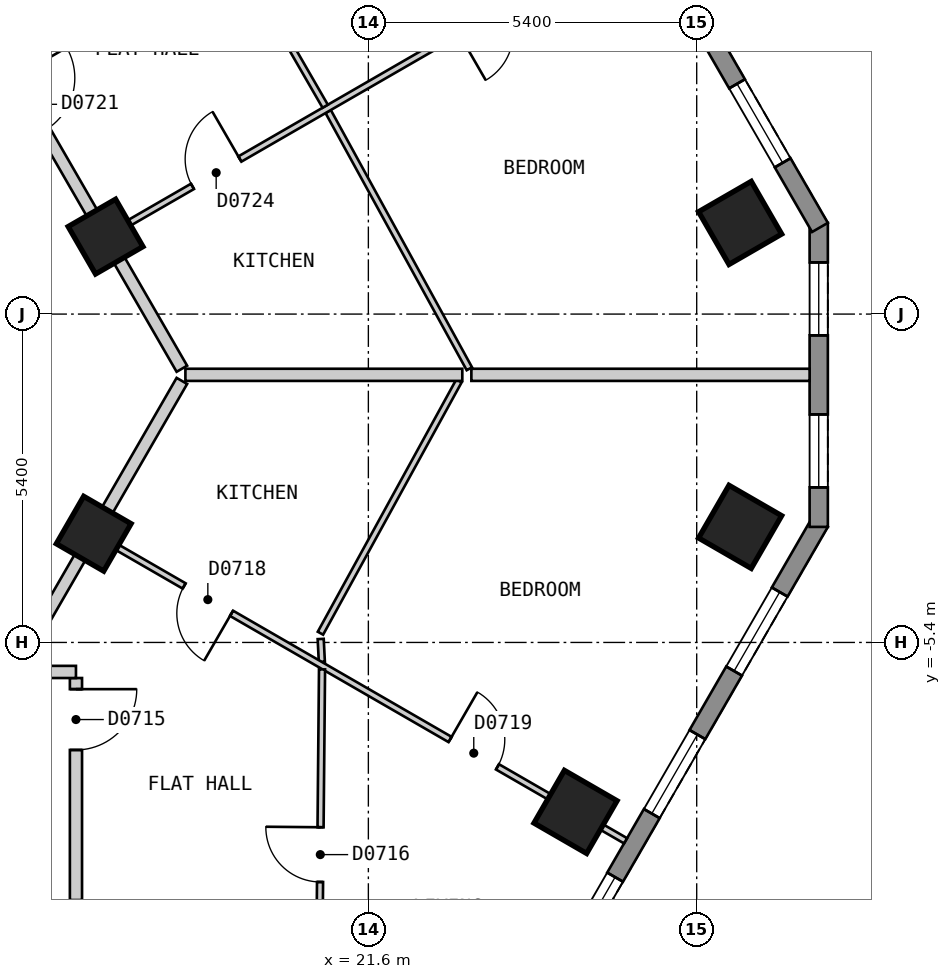
"""IFC4 building model, lengths in metres.
Left out: names, types, materials, properties, quantities, classifications, styles, units other than length and angle.
Written with IfcOpenShell. Run it as: python <this file> out.ifc"""

import sys

from ifc_helpers import new_model, si_unit, direction, frame, frame_2d, origin, origin_2d, place, context, subcontext, project, spatial, polyline, rectangle, outline, extrude, element, fill, save


model = new_model("IFC4")
c1 = context("Model", 3, precision=1e-05, world=origin(), true_north=direction((0.0, 1.0)))
c2 = subcontext(c1, "Body", "Model", "MODEL_VIEW")
j1 = project(units=[si_unit("LENGTHUNIT", "METRE"), si_unit("PLANEANGLEUNIT", "RADIAN")], contexts=[c1])
p1 = place(None, origin())
s1 = spatial("IfcSite", under=j1, at=p1, CompositionType="ELEMENT")
p2 = place(p1, origin())
s2 = spatial("IfcBuilding", under=s1, at=p2, CompositionType="ELEMENT")
p3 = place(p2, frame((0.0, 0.0, 99.0)))
s3 = spatial("IfcBuildingStorey", under=s2, at=p3, CompositionType="ELEMENT", Elevation=99.0)
for number, where, z_axis, x_axis in (
    (1, (25.007, -8.187, 0.0), (0.0, 0.0, 1.0), (0.5, 0.866, 0.0)),
    (2, (27.714, -3.499, 0.0), (0.0, 0.0, 1.0), (0.5, 0.866, 0.0)),
    (3, (27.714, 1.499, 0.0), (0.0, 0.0, 1.0), (-0.5, 0.866, 0.0)),
):
    element("IfcColumn", number, at=place(p3, frame(where, z_axis=z_axis, x_axis=x_axis)), inside=s3, PredefinedType="COLUMN", context=c2, shape_type="SweptSolid", body=[
        extrude(rectangle(XDim=1.0, YDim=1.0, at=origin_2d()), origin(), (0.0, 0.0, 1.0), 3.0),
    ])
for number, where, z_axis, x_axis in (
    (4, (17.083, -3.612, 0.0), (0.0, 0.0, 1.0), (0.5, 0.866, 0.0)),
    (5, (17.278, 1.274, 0.0), (0.0, 0.0, 1.0), (-0.5, 0.866, 0.0)),
):
    element("IfcColumn", number, at=place(p3, frame(where, z_axis=z_axis, x_axis=x_axis)), inside=s3, PredefinedType="COLUMN", context=c2, shape_type="SweptSolid", body=[
        extrude(rectangle(XDim=0.9, YDim=0.9, at=origin_2d()), origin(), (0.0, 0.0, 1.0), 3.0),
    ])
p4 = place(p3, frame((17.479, -23.425, 0.0), z_axis=(0.0, 0.0, 1.0), x_axis=(0.500035407905, 0.866004960056, 0.0)))
e6 = element("IfcWall", 6, at=p4, inside=s3, PredefinedType="SOLIDWALL", context=c2, shape_type="SweptSolid", body=[
    extrude(outline(polyline([(0.0, -0.15), (23.094, -0.15), (23.014, 0.15), (0.08, 0.15), (0.0, -0.15)])), origin(), (0.0, 0.0, 1.0), 2.7),
])
p5 = place(p4, frame((1.324, 0.0, 0.15)))
e7 = element("IfcOpeningElement", 7, at=p5, cuts=e6, PredefinedType="OPENING", context=c2, shape_type="SweptSolid", body=[
    extrude(rectangle(XDim=1.5, YDim=2.1, at=frame_2d((0.75, 1.05))), frame((0.0, 0.16, 0.0), z_axis=(0.0, -1.0, 0.0), x_axis=(1.0, 0.0, 0.0)), (0.0, 0.0, 1.0), 0.32),
])
p6 = place(p4, frame((4.031, 0.0, 0.15)))
e8 = element("IfcOpeningElement", 8, at=p6, cuts=e6, PredefinedType="OPENING", context=c2, shape_type="SweptSolid", body=[
    extrude(rectangle(XDim=1.5, YDim=2.1, at=frame_2d((0.75, 1.05))), frame((0.0, 0.16, 0.0), z_axis=(0.0, -1.0, 0.0), x_axis=(1.0, 0.0, 0.0)), (0.0, 0.0, 1.0), 0.32),
])
p7 = place(p4, frame((6.737, 0.0, 0.15)))
e9 = element("IfcOpeningElement", 9, at=p7, cuts=e6, PredefinedType="OPENING", context=c2, shape_type="SweptSolid", body=[
    extrude(rectangle(XDim=1.5, YDim=2.1, at=frame_2d((0.75, 1.05))), frame((0.0, 0.16, 0.0), z_axis=(0.0, -1.0, 0.0), x_axis=(1.0, 0.0, 0.0)), (0.0, 0.0, 1.0), 0.32),
])
p8 = place(p4, frame((9.444, 0.0, 0.15)))
e10 = element("IfcOpeningElement", 10, at=p8, cuts=e6, PredefinedType="OPENING", context=c2, shape_type="SweptSolid", body=[
    extrude(rectangle(XDim=1.5, YDim=2.1, at=frame_2d((0.75, 1.05))), frame((0.0, 0.16, 0.0), z_axis=(0.0, -1.0, 0.0), x_axis=(1.0, 0.0, 0.0)), (0.0, 0.0, 1.0), 0.32),
])
p9 = place(p4, frame((12.151, 0.0, 0.15)))
e11 = element("IfcOpeningElement", 11, at=p9, cuts=e6, PredefinedType="OPENING", context=c2, shape_type="SweptSolid", body=[
    extrude(rectangle(XDim=1.5, YDim=2.1, at=frame_2d((0.75, 1.05))), frame((0.0, 0.16, 0.0), z_axis=(0.0, -1.0, 0.0), x_axis=(1.0, 0.0, 0.0)), (0.0, 0.0, 1.0), 0.32),
])
p10 = place(p4, frame((14.857, 0.0, 0.15)))
e12 = element("IfcOpeningElement", 12, at=p10, cuts=e6, PredefinedType="OPENING", context=c2, shape_type="SweptSolid", body=[
    extrude(rectangle(XDim=1.5, YDim=2.1, at=frame_2d((0.75, 1.05))), frame((0.0, 0.16, 0.0), z_axis=(0.0, -1.0, 0.0), x_axis=(1.0, 0.0, 0.0)), (0.0, 0.0, 1.0), 0.32),
])
p11 = place(p4, frame((17.564, 0.0, 0.15)))
e13 = element("IfcOpeningElement", 13, at=p11, cuts=e6, PredefinedType="OPENING", context=c2, shape_type="SweptSolid", body=[
    extrude(rectangle(XDim=1.5, YDim=2.1, at=frame_2d((0.75, 1.05))), frame((0.0, 0.16, 0.0), z_axis=(0.0, -1.0, 0.0), x_axis=(1.0, 0.0, 0.0)), (0.0, 0.0, 1.0), 0.32),
])
p12 = place(p4, frame((20.271, 0.0, 0.15)))
e14 = element("IfcOpeningElement", 14, at=p12, cuts=e6, PredefinedType="OPENING", context=c2, shape_type="SweptSolid", body=[
    extrude(rectangle(XDim=1.5, YDim=2.1, at=frame_2d((0.75, 1.05))), frame((0.0, 0.16, 0.0), z_axis=(0.0, -1.0, 0.0), x_axis=(1.0, 0.0, 0.0)), (0.0, 0.0, 1.0), 0.32),
])
p13 = place(p3, frame((29.007, -3.5, 0.0), z_axis=(0.0, 0.0, 1.0), x_axis=(0.0, 1.0, 0.0)))
e15 = element("IfcWall", 15, at=p13, inside=s3, PredefinedType="SOLIDWALL", context=c2, shape_type="SweptSolid", body=[
    extrude(outline(polyline([(0.0, -0.15), (5.0, -0.15), (4.92, 0.15), (0.08, 0.15), (0.0, -0.15)])), origin(), (0.0, 0.0, 1.0), 2.7),
])
p14 = place(p13, frame((0.65, 0.0, 0.15)))
e16 = element("IfcOpeningElement", 16, at=p14, cuts=e15, PredefinedType="OPENING", context=c2, shape_type="SweptSolid", body=[
    extrude(rectangle(XDim=1.2, YDim=2.1, at=frame_2d((0.6, 1.05))), frame((0.0, 0.16, 0.0), z_axis=(0.0, -1.0, 0.0), x_axis=(1.0, 0.0, 0.0)), (0.0, 0.0, 1.0), 0.32),
])
p15 = place(p13, frame((3.15, 0.0, 0.15)))
e17 = element("IfcOpeningElement", 17, at=p15, cuts=e15, PredefinedType="OPENING", context=c2, shape_type="SweptSolid", body=[
    extrude(rectangle(XDim=1.2, YDim=2.1, at=frame_2d((0.6, 1.05))), frame((0.0, 0.16, 0.0), z_axis=(0.0, -1.0, 0.0), x_axis=(1.0, 0.0, 0.0)), (0.0, 0.0, 1.0), 0.32),
])
p16 = place(p3, frame((29.027, 1.425, 0.0), z_axis=(0.0, 0.0, 1.0), x_axis=(-0.500027479704, 0.866009537788, 0.0)))
e18 = element("IfcWall", 18, at=p16, inside=s3, PredefinedType="SOLIDWALL", context=c2, shape_type="SweptSolid", body=[
    extrude(outline(polyline([(0.0, -0.15), (26.559, -0.15), (26.478, 0.15), (0.08, 0.15), (0.0, -0.15)])), origin(), (0.0, 0.0, 1.0), 2.7),
])
p17 = place(p16, frame((1.227, 0.0, 0.15)))
e19 = element("IfcOpeningElement", 19, at=p17, cuts=e18, PredefinedType="OPENING", context=c2, shape_type="SweptSolid", body=[
    extrude(rectangle(XDim=1.5, YDim=2.1, at=frame_2d((0.75, 1.05))), frame((0.0, 0.16, 0.0), z_axis=(0.0, -1.0, 0.0), x_axis=(1.0, 0.0, 0.0)), (0.0, 0.0, 1.0), 0.32),
])
p18 = place(p16, frame((3.738, 0.0, 0.15)))
e20 = element("IfcOpeningElement", 20, at=p18, cuts=e18, PredefinedType="OPENING", context=c2, shape_type="SweptSolid", body=[
    extrude(rectangle(XDim=1.5, YDim=2.1, at=frame_2d((0.75, 1.05))), frame((0.0, 0.16, 0.0), z_axis=(0.0, -1.0, 0.0), x_axis=(1.0, 0.0, 0.0)), (0.0, 0.0, 1.0), 0.32),
])
p19 = place(p16, frame((6.25, 0.0, 0.15)))
e21 = element("IfcOpeningElement", 21, at=p19, cuts=e18, PredefinedType="OPENING", context=c2, shape_type="SweptSolid", body=[
    extrude(rectangle(XDim=1.5, YDim=2.1, at=frame_2d((0.75, 1.05))), frame((0.0, 0.16, 0.0), z_axis=(0.0, -1.0, 0.0), x_axis=(1.0, 0.0, 0.0)), (0.0, 0.0, 1.0), 0.32),
])
p20 = place(p16, frame((8.761, 0.0, 0.15)))
e22 = element("IfcOpeningElement", 22, at=p20, cuts=e18, PredefinedType="OPENING", context=c2, shape_type="SweptSolid", body=[
    extrude(rectangle(XDim=1.5, YDim=2.1, at=frame_2d((0.75, 1.05))), frame((0.0, 0.16, 0.0), z_axis=(0.0, -1.0, 0.0), x_axis=(1.0, 0.0, 0.0)), (0.0, 0.0, 1.0), 0.32),
])
p21 = place(p16, frame((11.273, 0.0, 0.15)))
e23 = element("IfcOpeningElement", 23, at=p21, cuts=e18, PredefinedType="OPENING", context=c2, shape_type="SweptSolid", body=[
    extrude(rectangle(XDim=1.5, YDim=2.1, at=frame_2d((0.75, 1.05))), frame((0.0, 0.16, 0.0), z_axis=(0.0, -1.0, 0.0), x_axis=(1.0, 0.0, 0.0)), (0.0, 0.0, 1.0), 0.32),
])
p22 = place(p16, frame((13.785, 0.0, 0.15)))
e24 = element("IfcOpeningElement", 24, at=p22, cuts=e18, PredefinedType="OPENING", context=c2, shape_type="SweptSolid", body=[
    extrude(rectangle(XDim=1.5, YDim=2.1, at=frame_2d((0.75, 1.05))), frame((0.0, 0.16, 0.0), z_axis=(0.0, -1.0, 0.0), x_axis=(1.0, 0.0, 0.0)), (0.0, 0.0, 1.0), 0.32),
])
p23 = place(p16, frame((16.296, 0.0, 0.15)))
e25 = element("IfcOpeningElement", 25, at=p23, cuts=e18, PredefinedType="OPENING", context=c2, shape_type="SweptSolid", body=[
    extrude(rectangle(XDim=1.5, YDim=2.1, at=frame_2d((0.75, 1.05))), frame((0.0, 0.16, 0.0), z_axis=(0.0, -1.0, 0.0), x_axis=(1.0, 0.0, 0.0)), (0.0, 0.0, 1.0), 0.32),
])
p24 = place(p16, frame((18.807, 0.0, 0.15)))
e26 = element("IfcOpeningElement", 26, at=p24, cuts=e18, PredefinedType="OPENING", context=c2, shape_type="SweptSolid", body=[
    extrude(rectangle(XDim=1.5, YDim=2.1, at=frame_2d((0.75, 1.05))), frame((0.0, 0.16, 0.0), z_axis=(0.0, -1.0, 0.0), x_axis=(1.0, 0.0, 0.0)), (0.0, 0.0, 1.0), 0.32),
])
p25 = place(p16, frame((21.319, 0.0, 0.15)))
e27 = element("IfcOpeningElement", 27, at=p25, cuts=e18, PredefinedType="OPENING", context=c2, shape_type="SweptSolid", body=[
    extrude(rectangle(XDim=1.5, YDim=2.1, at=frame_2d((0.75, 1.05))), frame((0.0, 0.16, 0.0), z_axis=(0.0, -1.0, 0.0), x_axis=(1.0, 0.0, 0.0)), (0.0, 0.0, 1.0), 0.32),
])
p26 = place(p16, frame((23.831, 0.0, 0.15)))
e28 = element("IfcOpeningElement", 28, at=p26, cuts=e18, PredefinedType="OPENING", context=c2, shape_type="SweptSolid", body=[
    extrude(rectangle(XDim=1.5, YDim=2.1, at=frame_2d((0.75, 1.05))), frame((0.0, 0.16, 0.0), z_axis=(0.0, -1.0, 0.0), x_axis=(1.0, 0.0, 0.0)), (0.0, 0.0, 1.0), 0.32),
])
p27 = place(p3, frame((8.488, 16.5, 0.0), z_axis=(0.0, 0.0, 1.0), x_axis=(0.499986836607, -0.86603300354, 0.0)))
e29 = element("IfcWall", 29, at=p27, inside=s3, PredefinedType="PARTITIONING", context=c2, shape_type="SweptSolid", body=[
    extrude(rectangle(XDim=20.09, YDim=0.2, at=frame_2d((10.045, 0.0))), origin(), (0.0, 0.0, 1.0), 2.7),
])
p28 = place(p27, frame((14.569, 0.0, 0.0)))
e30 = element("IfcOpeningElement", 30, at=p28, cuts=e29, PredefinedType="OPENING", context=c2, shape_type="SweptSolid", body=[
    extrude(rectangle(XDim=1.0, YDim=2.1, at=frame_2d((0.5, 1.05))), frame((0.0, 0.11, 0.0), z_axis=(0.0, -1.0, 0.0), x_axis=(1.0, 0.0, 0.0)), (0.0, 0.0, 1.0), 0.22),
])
p29 = place(p27, frame((4.547, 0.0, 0.0)))
e31 = element("IfcOpeningElement", 31, at=p29, cuts=e29, PredefinedType="OPENING", context=c2, shape_type="SweptSolid", body=[
    extrude(rectangle(XDim=1.0, YDim=2.1, at=frame_2d((0.5, 1.05))), frame((0.0, 0.11, 0.0), z_axis=(0.0, -1.0, 0.0), x_axis=(1.0, 0.0, 0.0)), (0.0, 0.0, 1.0), 0.22),
])
p30 = place(p3, frame((16.791, -5.985, 0.0), z_axis=(0.0, 0.0, 1.0), x_axis=(0.0, -1.0, 0.0)))
e32 = element("IfcWall", 32, at=p30, inside=s3, PredefinedType="PARTITIONING", context=c2, shape_type="SweptSolid", body=[
    extrude(rectangle(XDim=3.651, YDim=0.2, at=frame_2d((1.825, 0.0))), origin(), (0.0, 0.0, 1.0), 2.7),
])
p31 = place(p30, frame((0.183, 0.0, 0.0)))
e33 = element("IfcOpeningElement", 33, at=p31, cuts=e32, PredefinedType="OPENING", context=c2, shape_type="SweptSolid", body=[
    extrude(rectangle(XDim=1.0, YDim=2.1, at=frame_2d((0.5, 1.05))), frame((0.0, 0.11, 0.0), z_axis=(0.0, -1.0, 0.0), x_axis=(1.0, 0.0, 0.0)), (0.0, 0.0, 1.0), 0.22),
])
p32 = place(p3, frame((15.887, -5.885, 0.0), z_axis=(0.0, 0.0, 1.0), x_axis=(1.0, 0.0, 0.0)))
e34 = element("IfcWall", 34, at=p32, inside=s3, PredefinedType="PARTITIONING", context=c2, shape_type="SweptSolid", body=[
    extrude(rectangle(XDim=0.904, YDim=0.2, at=frame_2d((0.452, 0.0))), origin(), (0.0, 0.0, 1.0), 2.7),
])
p33 = place(p3, frame((15.771, -5.884, 0.0), z_axis=(0.0, 0.0, 1.0), x_axis=(0.499917542299, 0.866073005526, 0.0)))
e35 = element("IfcWall", 35, at=p33, inside=s3, PredefinedType="PARTITIONING", context=c2, shape_type="SweptSolid", body=[
    extrude(rectangle(XDim=5.525, YDim=0.2, at=frame_2d((2.762, 0.0))), origin(), (0.0, 0.0, 1.0), 2.7),
])
p34 = place(p3, frame((20.939, 3.331, 0.0), z_axis=(0.0, 0.0, 1.0), x_axis=(0.481207738216, -0.876606589458, 0.0)))
e36 = element("IfcWall", 36, at=p34, inside=s3, PredefinedType="PARTITIONING", context=c2, shape_type="SweptSolid", body=[
    extrude(rectangle(XDim=4.825, YDim=0.1, at=frame_2d((2.413, 0.0))), origin(), (0.0, 0.0, 1.0), 2.7),
])
p35 = place(p3, frame((20.816, -5.343, 0.0), z_axis=(0.0, 0.0, 1.0), x_axis=(0.05045379463, -0.99872639627, 0.0)))
e37 = element("IfcWall", 37, at=p35, inside=s3, PredefinedType="PARTITIONING", context=c2, shape_type="SweptSolid", body=[
    extrude(rectangle(XDim=0.377, YDim=0.1, at=frame_2d((0.189, 0.0))), origin(), (0.0, 0.0, 1.0), 2.7),
])
p36 = place(p3, frame((17.169, -3.662, 0.0), z_axis=(0.0, 0.0, 1.0), x_axis=(0.866047370643, -0.499961950354, 0.0)))
e38 = element("IfcWall", 38, at=p36, inside=s3, PredefinedType="PARTITIONING", context=c2, shape_type="SweptSolid", body=[
    extrude(rectangle(XDim=10.001, YDim=0.1, at=frame_2d((5.0, 0.0))), origin(), (0.0, 0.0, 1.0), 2.7),
])
p37 = place(p36, frame((1.618, 0.0, 0.0)))
e39 = element("IfcOpeningElement", 39, at=p37, cuts=e38, PredefinedType="OPENING", context=c2, shape_type="SweptSolid", body=[
    extrude(rectangle(XDim=0.9, YDim=2.1, at=frame_2d((0.45, 1.05))), frame((0.0, 0.06, 0.0), z_axis=(0.0, -1.0, 0.0), x_axis=(1.0, 0.0, 0.0)), (0.0, 0.0, 1.0), 0.12),
])
p38 = place(p36, frame((6.668, 0.0, 0.0)))
e40 = element("IfcOpeningElement", 40, at=p38, cuts=e38, PredefinedType="OPENING", context=c2, shape_type="SweptSolid", body=[
    extrude(rectangle(XDim=0.9, YDim=2.1, at=frame_2d((0.45, 1.05))), frame((0.0, 0.06, 0.0), z_axis=(0.0, -1.0, 0.0), x_axis=(1.0, 0.0, 0.0)), (0.0, 0.0, 1.0), 0.12),
])
p39 = place(p3, frame((20.812, -5.248, 0.0), z_axis=(0.0, 0.0, 1.0), x_axis=(0.481296891345, 0.876557643502, 0.0)))
e41 = element("IfcWall", 41, at=p39, inside=s3, PredefinedType="PARTITIONING", context=c2, shape_type="SweptSolid", body=[
    extrude(rectangle(XDim=4.733, YDim=0.1, at=frame_2d((2.367, 0.0))), origin(), (0.0, 0.0, 1.0), 2.7),
])
p40 = place(p3, frame((20.781, -11.94, 0.0), z_axis=(0.0, 0.0, 1.0), x_axis=(0.009329670416, 0.999956477678, 0.0)))
e42 = element("IfcWall", 42, at=p40, inside=s3, PredefinedType="PARTITIONING", context=c2, shape_type="SweptSolid", body=[
    extrude(rectangle(XDim=6.097, YDim=0.1, at=frame_2d((3.049, 0.0))), origin(), (0.0, 0.0, 1.0), 2.7),
])
p41 = place(p40, frame((2.601, 0.0, 0.0)))
e43 = element("IfcOpeningElement", 43, at=p41, cuts=e42, PredefinedType="OPENING", context=c2, shape_type="SweptSolid", body=[
    extrude(rectangle(XDim=0.9, YDim=2.1, at=frame_2d((0.45, 1.05))), frame((0.0, 0.06, 0.0), z_axis=(0.0, -1.0, 0.0), x_axis=(1.0, 0.0, 0.0)), (0.0, 0.0, 1.0), 0.12),
])
p42 = place(p3, frame((17.365, 1.325, 0.0), z_axis=(0.0, 0.0, 1.0), x_axis=(0.866016855193, 0.500014806302, 0.0)))
e44 = element("IfcWall", 44, at=p42, inside=s3, PredefinedType="PARTITIONING", context=c2, shape_type="SweptSolid", body=[
    extrude(rectangle(XDim=10.0, YDim=0.1, at=frame_2d((5.0, 0.0))), origin(), (0.0, 0.0, 1.0), 2.7),
])
p43 = place(p42, frame((1.55, 0.0, 0.0)))
e45 = element("IfcOpeningElement", 45, at=p43, cuts=e44, PredefinedType="OPENING", context=c2, shape_type="SweptSolid", body=[
    extrude(rectangle(XDim=0.9, YDim=2.1, at=frame_2d((0.45, 1.05))), frame((0.0, 0.06, 0.0), z_axis=(0.0, -1.0, 0.0), x_axis=(1.0, 0.0, 0.0)), (0.0, 0.0, 1.0), 0.12),
])
p44 = place(p42, frame((6.6, 0.0, 0.0)))
e46 = element("IfcOpeningElement", 46, at=p44, cuts=e44, PredefinedType="OPENING", context=c2, shape_type="SweptSolid", body=[
    extrude(rectangle(XDim=0.9, YDim=2.1, at=frame_2d((0.45, 1.05))), frame((0.0, 0.06, 0.0), z_axis=(0.0, -1.0, 0.0), x_axis=(1.0, 0.0, 0.0)), (0.0, 0.0, 1.0), 0.12),
])
p45 = place(p3, frame((18.591, -0.999, 0.0), z_axis=(0.0, 0.0, 1.0), x_axis=(1.0, 0.0, 0.0)))
e47 = element("IfcWall", 47, at=p45, inside=s3, PredefinedType="PARTITIONING", context=c2, shape_type="SweptSolid", body=[
    extrude(rectangle(XDim=4.554, YDim=0.2, at=frame_2d((2.277, 0.0))), origin(), (0.0, 0.0, 1.0), 2.7),
])
p46 = place(p3, frame((23.294, -0.999, 0.0), z_axis=(0.0, 0.0, 1.0), x_axis=(1.0, 0.0, 0.0)))
e48 = element("IfcWall", 48, at=p46, inside=s3, PredefinedType="PARTITIONING", context=c2, shape_type="SweptSolid", body=[
    extrude(rectangle(XDim=5.563, YDim=0.2, at=frame_2d((2.781, 0.0))), origin(), (0.0, 0.0, 1.0), 2.7),
])
p47 = place(p3, frame((18.403, 7.725, 0.0), z_axis=(0.0, 0.0, 1.0), x_axis=(0.500014231302, -0.866017187182, 0.0)))
e49 = element("IfcWall", 49, at=p47, inside=s3, PredefinedType="PARTITIONING", context=c2, shape_type="SweptSolid", body=[
    extrude(rectangle(XDim=4.973, YDim=0.1, at=frame_2d((2.487, 0.0))), origin(), (0.0, 0.0, 1.0), 2.7),
])
p48 = place(p47, frame((2.061, 0.0, 0.0)))
e50 = element("IfcOpeningElement", 50, at=p48, cuts=e49, PredefinedType="OPENING", context=c2, shape_type="SweptSolid", body=[
    extrude(rectangle(XDim=0.9, YDim=2.1, at=frame_2d((0.45, 1.05))), frame((0.0, 0.06, 0.0), z_axis=(0.0, -1.0, 0.0), x_axis=(1.0, 0.0, 0.0)), (0.0, 0.0, 1.0), 0.12),
])
p49 = place(p10, origin())
e51 = element("IfcWindow", 51, at=p49, inside=s3, PartitioningType="SINGLE_PANEL", PredefinedType="WINDOW", context=c2, shape_type="SweptSolid", body=[
    extrude(rectangle(XDim=1.5, YDim=2.1, at=frame_2d((0.75, 1.05))), frame((0.0, 0.03, 0.0), z_axis=(0.0, -1.0, 0.0), x_axis=(1.0, 0.0, 0.0)), (0.0, 0.0, 1.0), 0.06),
])
fill(e12, e51)
p50 = place(p11, origin())
e52 = element("IfcWindow", 52, at=p50, inside=s3, PartitioningType="SINGLE_PANEL", PredefinedType="WINDOW", context=c2, shape_type="SweptSolid", body=[
    extrude(rectangle(XDim=1.5, YDim=2.1, at=frame_2d((0.75, 1.05))), frame((0.0, 0.03, 0.0), z_axis=(0.0, -1.0, 0.0), x_axis=(1.0, 0.0, 0.0)), (0.0, 0.0, 1.0), 0.06),
])
fill(e13, e52)
p51 = place(p12, origin())
e53 = element("IfcWindow", 53, at=p51, inside=s3, PartitioningType="SINGLE_PANEL", PredefinedType="WINDOW", context=c2, shape_type="SweptSolid", body=[
    extrude(rectangle(XDim=1.5, YDim=2.1, at=frame_2d((0.75, 1.05))), frame((0.0, 0.03, 0.0), z_axis=(0.0, -1.0, 0.0), x_axis=(1.0, 0.0, 0.0)), (0.0, 0.0, 1.0), 0.06),
])
fill(e14, e53)
p52 = place(p14, origin())
e54 = element("IfcWindow", 54, at=p52, inside=s3, PartitioningType="SINGLE_PANEL", PredefinedType="WINDOW", context=c2, shape_type="SweptSolid", body=[
    extrude(rectangle(XDim=1.2, YDim=2.1, at=frame_2d((0.6, 1.05))), frame((0.0, 0.03, 0.0), z_axis=(0.0, -1.0, 0.0), x_axis=(1.0, 0.0, 0.0)), (0.0, 0.0, 1.0), 0.06),
])
fill(e16, e54)
p53 = place(p15, origin())
e55 = element("IfcWindow", 55, at=p53, inside=s3, PartitioningType="SINGLE_PANEL", PredefinedType="WINDOW", context=c2, shape_type="SweptSolid", body=[
    extrude(rectangle(XDim=1.2, YDim=2.1, at=frame_2d((0.6, 1.05))), frame((0.0, 0.03, 0.0), z_axis=(0.0, -1.0, 0.0), x_axis=(1.0, 0.0, 0.0)), (0.0, 0.0, 1.0), 0.06),
])
fill(e17, e55)
p54 = place(p17, origin())
e56 = element("IfcWindow", 56, at=p54, inside=s3, PartitioningType="SINGLE_PANEL", PredefinedType="WINDOW", context=c2, shape_type="SweptSolid", body=[
    extrude(rectangle(XDim=1.5, YDim=2.1, at=frame_2d((0.75, 1.05))), frame((0.0, 0.03, 0.0), z_axis=(0.0, -1.0, 0.0), x_axis=(1.0, 0.0, 0.0)), (0.0, 0.0, 1.0), 0.06),
])
fill(e19, e56)
p55 = place(p31, origin())
e57 = element("IfcDoor", 57, at=p55, inside=s3, OperationType="SINGLE_SWING_LEFT", PredefinedType="DOOR", context=c2, shape_type="SweptSolid", body=[
    extrude(rectangle(XDim=1.0, YDim=2.1, at=frame_2d((0.5, 1.05))), frame((0.0, 0.025, 0.0), z_axis=(0.0, -1.0, 0.0), x_axis=(1.0, 0.0, 0.0)), (0.0, 0.0, 1.0), 0.05),
])
fill(e33, e57)
p56 = place(p41, origin())
e58 = element("IfcDoor", 58, at=p56, inside=s3, OperationType="SINGLE_SWING_RIGHT", PredefinedType="DOOR", context=c2, shape_type="SweptSolid", body=[
    extrude(rectangle(XDim=0.9, YDim=2.1, at=frame_2d((0.45, 1.05))), frame((0.0, 0.025, 0.0), z_axis=(0.0, -1.0, 0.0), x_axis=(1.0, 0.0, 0.0)), (0.0, 0.0, 1.0), 0.05),
])
fill(e43, e58)
p57 = place(p37, origin())
e59 = element("IfcDoor", 59, at=p57, inside=s3, OperationType="SINGLE_SWING_RIGHT", PredefinedType="DOOR", context=c2, shape_type="SweptSolid", body=[
    extrude(rectangle(XDim=0.9, YDim=2.1, at=frame_2d((0.45, 1.05))), frame((0.0, 0.025, 0.0), z_axis=(0.0, -1.0, 0.0), x_axis=(1.0, 0.0, 0.0)), (0.0, 0.0, 1.0), 0.05),
])
fill(e39, e59)
p58 = place(p38, origin())
e60 = element("IfcDoor", 60, at=p58, inside=s3, OperationType="SINGLE_SWING_LEFT", PredefinedType="DOOR", context=c2, shape_type="SweptSolid", body=[
    extrude(rectangle(XDim=0.9, YDim=2.1, at=frame_2d((0.45, 1.05))), frame((0.0, 0.025, 0.0), z_axis=(0.0, -1.0, 0.0), x_axis=(1.0, 0.0, 0.0)), (0.0, 0.0, 1.0), 0.05),
])
fill(e40, e60)
p59 = place(p43, origin())
e61 = element("IfcDoor", 61, at=p59, inside=s3, OperationType="SINGLE_SWING_RIGHT", PredefinedType="DOOR", context=c2, shape_type="SweptSolid", body=[
    extrude(rectangle(XDim=0.9, YDim=2.1, at=frame_2d((0.45, 1.05))), frame((0.0, 0.025, 0.0), z_axis=(0.0, -1.0, 0.0), x_axis=(1.0, 0.0, 0.0)), (0.0, 0.0, 1.0), 0.05),
])
fill(e45, e61)
save(model, sys.argv[1])
